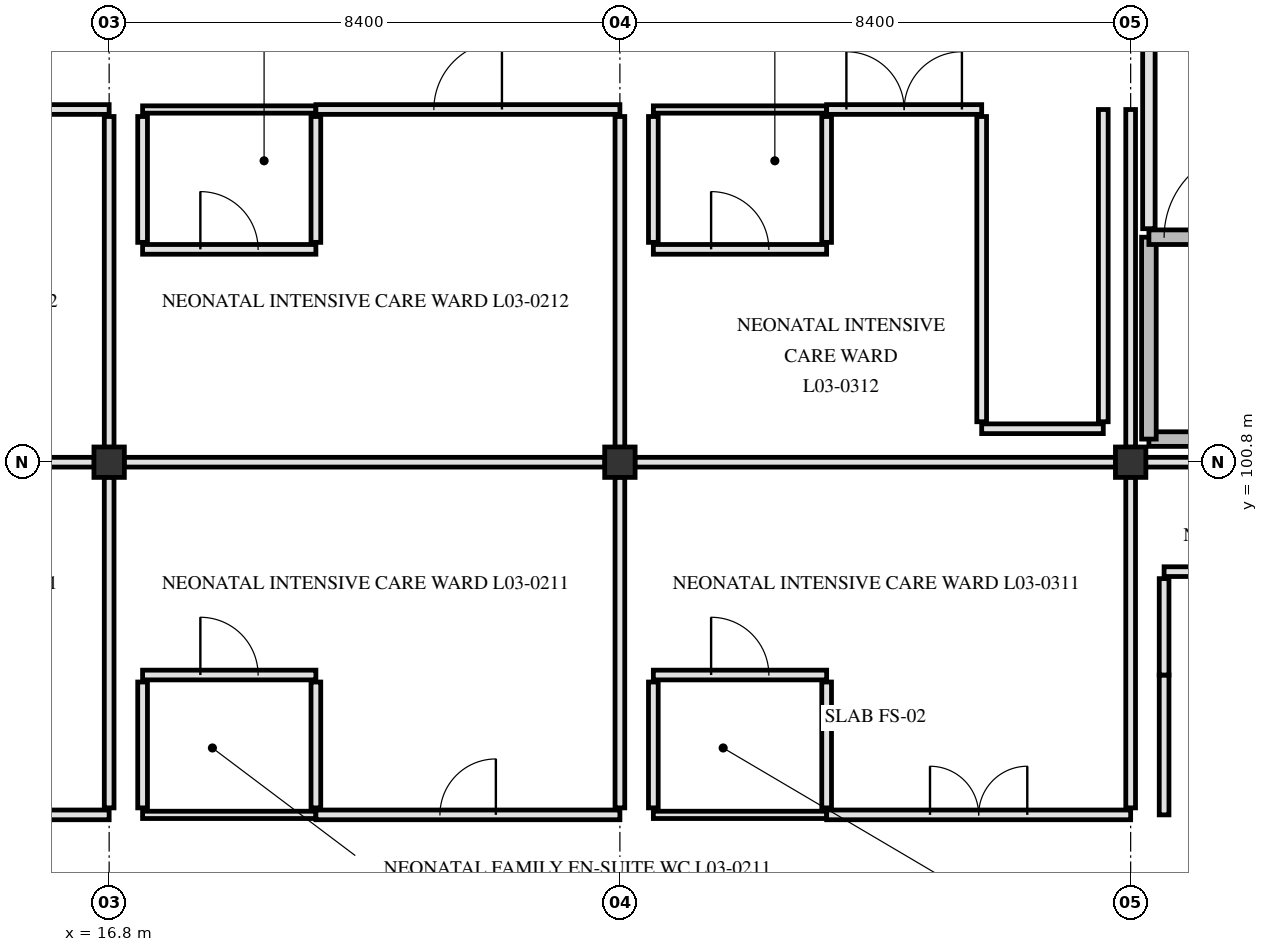
"""IFC4 building model, lengths in metres.
Left out: names, types, materials, properties, quantities, classifications, styles, units other than length and angle.
Written with IfcOpenShell. Run it as: python <this file> out.ifc"""

import sys

from ifc_helpers import new_model, si_unit, direction, frame, frame_2d, origin, origin_2d, place, context, subcontext, project, spatial, rectangle, extrude, element, fill, save


model = new_model("IFC4")
c1 = context("Model", 3, precision=1e-05, world=origin(), true_north=direction((0.0, 1.0)))
c2 = subcontext(c1, "Body", "Model", "MODEL_VIEW")
j1 = project(units=[si_unit("LENGTHUNIT", "METRE"), si_unit("PLANEANGLEUNIT", "RADIAN")], contexts=[c1])
p1 = place(None, origin())
s1 = spatial("IfcSite", under=j1, at=p1, CompositionType="ELEMENT")
p2 = place(p1, origin())
s2 = spatial("IfcBuilding", under=s1, at=p2, CompositionType="ELEMENT")
p3 = place(p2, frame((0.0, 0.0, 14.4)))
s3 = spatial("IfcBuildingStorey", under=s2, at=p3, CompositionType="ELEMENT", Elevation=14.4)
for number, where, z_axis, x_axis in (
    (1, (16.8, 100.8, 0.0), (0.0, 0.0, 1.0), (1.0, 0.0, 0.0)),
    (2, (25.2, 100.8, 0.0), (0.0, 0.0, 1.0), (1.0, 0.0, 0.0)),
    (3, (33.6, 100.8, 0.0), (0.0, 0.0, 1.0), (1.0, 0.0, 0.0)),
):
    element("IfcColumn", number, at=place(p3, frame(where, z_axis=z_axis, x_axis=x_axis)), inside=s3, PredefinedType="COLUMN", context=c2, shape_type="SweptSolid", body=[
        extrude(rectangle(XDim=0.5, YDim=0.5, at=origin_2d()), origin(), (0.0, 0.0, 1.0), 4.2),
    ])
p4 = place(p3, frame((33.9, 101.18, 0.0), z_axis=(0.0, 0.0, 1.0), x_axis=(1.0, 0.0, 0.0)))
e4 = element("IfcWall", 4, at=p4, inside=s3, PredefinedType="SHEAR", context=c2, shape_type="SweptSolid", body=[
    extrude(rectangle(XDim=7.82, YDim=0.24, at=frame_2d((3.91, 0.0))), origin(), (0.0, 0.0, 1.0), 3.9),
])
p5 = place(p3, frame((33.9, 101.18, 0.0), z_axis=(0.0, 0.0, 1.0), x_axis=(0.0, 1.0, 0.0)))
e5 = element("IfcWall", 5, at=p5, inside=s3, PredefinedType="SHEAR", context=c2, shape_type="SweptSolid", body=[
    extrude(rectangle(XDim=3.32, YDim=0.24, at=frame_2d((1.66, 0.0))), origin(), (0.0, 0.0, 1.0), 3.9),
])
p6 = place(p3, frame((33.9, 104.5, 0.0), z_axis=(0.0, 0.0, 1.0), x_axis=(1.0, 0.0, 0.0)))
e6 = element("IfcWall", 6, at=p6, inside=s3, PredefinedType="SHEAR", context=c2, shape_type="SweptSolid", body=[
    extrude(rectangle(XDim=7.82, YDim=0.24, at=frame_2d((3.91, 0.0))), origin(), (0.0, 0.0, 1.0), 3.9),
])
p7 = place(p6, frame((0.25, 0.0, 0.0)))
e7 = element("IfcOpeningElement", 7, at=p7, cuts=e6, PredefinedType="OPENING", context=c2, shape_type="SweptSolid", body=[
    extrude(rectangle(XDim=1.45, YDim=2.2, at=frame_2d((0.725, 1.1))), frame((0.0, 0.13, 0.0), z_axis=(0.0, -1.0, 0.0), x_axis=(1.0, 0.0, 0.0)), (0.0, 0.0, 1.0), 0.26),
])
p8 = place(p3, frame((33.9, 104.64, 0.0), z_axis=(0.0, 0.0, 1.0), x_axis=(0.0, 1.0, 0.0)))
e8 = element("IfcWall", 8, at=p8, inside=s3, PredefinedType="PARTITIONING", context=c2, shape_type="SweptSolid", body=[
    extrude(rectangle(XDim=4.12, YDim=0.205, at=frame_2d((2.06, 0.0))), origin(), (0.0, 0.0, 1.0), 3.33),
])
p9 = place(p3, frame((11.8, 95.0, 0.0), z_axis=(0.0, 0.0, 1.0), x_axis=(1.0, 0.0, 0.0)))
e9 = element("IfcWall", 9, at=p9, inside=s3, PredefinedType="PARTITIONING", context=c2, shape_type="SweptSolid", body=[
    extrude(rectangle(XDim=5.0, YDim=0.16, at=frame_2d((2.5, 0.0))), origin(), (0.0, 0.0, 1.0), 3.33),
])
p10 = place(p9, frame((1.85, 0.0, 0.0)))
e10 = element("IfcOpeningElement", 10, at=p10, cuts=e9, PredefinedType="OPENING", context=c2, shape_type="SweptSolid", body=[
    extrude(rectangle(XDim=1.3, YDim=2.2, at=frame_2d((0.65, 1.1))), frame((0.0, 0.09, 0.0), z_axis=(0.0, -1.0, 0.0), x_axis=(1.0, 0.0, 0.0)), (0.0, 0.0, 1.0), 0.18),
])
p11 = place(p3, frame((17.35, 95.0, 0.0), z_axis=(0.0, 0.0, 1.0), x_axis=(1.0, 0.0, 0.0)))
e11 = element("IfcWall", 11, at=p11, inside=s3, PredefinedType="PARTITIONING", context=c2, shape_type="SweptSolid", body=[
    extrude(rectangle(XDim=2.85, YDim=0.12, at=frame_2d((1.425, 0.0))), origin(), (0.0, 0.0, 1.0), 3.89),
])
p12 = place(p3, frame((20.2, 95.0, 0.0), z_axis=(0.0, 0.0, 1.0), x_axis=(1.0, 0.0, 0.0)))
e12 = element("IfcWall", 12, at=p12, inside=s3, PredefinedType="PARTITIONING", context=c2, shape_type="SweptSolid", body=[
    extrude(rectangle(XDim=5.0, YDim=0.16, at=frame_2d((2.5, 0.0))), origin(), (0.0, 0.0, 1.0), 3.33),
])
p13 = place(p12, frame((2.04, 0.0, 0.0)))
e13 = element("IfcOpeningElement", 13, at=p13, cuts=e12, PredefinedType="OPENING", context=c2, shape_type="SweptSolid", body=[
    extrude(rectangle(XDim=0.92, YDim=2.08, at=frame_2d((0.46, 1.04))), frame((0.0, 0.09, 0.0), z_axis=(0.0, -1.0, 0.0), x_axis=(1.0, 0.0, 0.0)), (0.0, 0.0, 1.0), 0.18),
])
p14 = place(p3, frame((25.75, 95.0, 0.0), z_axis=(0.0, 0.0, 1.0), x_axis=(1.0, 0.0, 0.0)))
e14 = element("IfcWall", 14, at=p14, inside=s3, PredefinedType="PARTITIONING", context=c2, shape_type="SweptSolid", body=[
    extrude(rectangle(XDim=2.85, YDim=0.12, at=frame_2d((1.425, 0.0))), origin(), (0.0, 0.0, 1.0), 3.89),
])
p15 = place(p3, frame((28.6, 95.0, 0.0), z_axis=(0.0, 0.0, 1.0), x_axis=(1.0, 0.0, 0.0)))
e15 = element("IfcWall", 15, at=p15, inside=s3, PredefinedType="PARTITIONING", context=c2, shape_type="SweptSolid", body=[
    extrude(rectangle(XDim=5.0, YDim=0.16, at=frame_2d((2.5, 0.0))), origin(), (0.0, 0.0, 1.0), 3.33),
])
p16 = place(p15, frame((1.7, 0.0, 0.0)))
e16 = element("IfcOpeningElement", 16, at=p16, cuts=e15, PredefinedType="OPENING", context=c2, shape_type="SweptSolid", body=[
    extrude(rectangle(XDim=1.6, YDim=2.25, at=frame_2d((0.8, 1.125))), frame((0.0, 0.09, 0.0), z_axis=(0.0, -1.0, 0.0), x_axis=(1.0, 0.0, 0.0)), (0.0, 0.0, 1.0), 0.18),
])
p17 = place(p3, frame((17.35, 97.3, 0.0), z_axis=(0.0, 0.0, 1.0), x_axis=(1.0, 0.0, 0.0)))
e17 = element("IfcWall", 17, at=p17, inside=s3, PredefinedType="PARTITIONING", context=c2, shape_type="SweptSolid", body=[
    extrude(rectangle(XDim=2.85, YDim=0.16, at=frame_2d((1.425, 0.0))), origin(), (0.0, 0.0, 1.0), 3.89),
])
p18 = place(p17, frame((0.95, 0.0, 0.0)))
e18 = element("IfcOpeningElement", 18, at=p18, cuts=e17, PredefinedType="OPENING", context=c2, shape_type="SweptSolid", body=[
    extrude(rectangle(XDim=0.95, YDim=2.1, at=frame_2d((0.475, 1.05))), frame((0.0, 0.09, 0.0), z_axis=(0.0, -1.0, 0.0), x_axis=(1.0, 0.0, 0.0)), (0.0, 0.0, 1.0), 0.18),
])
p19 = place(p3, frame((25.75, 97.3, 0.0), z_axis=(0.0, 0.0, 1.0), x_axis=(1.0, 0.0, 0.0)))
e19 = element("IfcWall", 19, at=p19, inside=s3, PredefinedType="PARTITIONING", context=c2, shape_type="SweptSolid", body=[
    extrude(rectangle(XDim=2.85, YDim=0.16, at=frame_2d((1.425, 0.0))), origin(), (0.0, 0.0, 1.0), 3.89),
])
p20 = place(p19, frame((0.95, 0.0, 0.0)))
e20 = element("IfcOpeningElement", 20, at=p20, cuts=e19, PredefinedType="OPENING", context=c2, shape_type="SweptSolid", body=[
    extrude(rectangle(XDim=0.95, YDim=2.1, at=frame_2d((0.475, 1.05))), frame((0.0, 0.09, 0.0), z_axis=(0.0, -1.0, 0.0), x_axis=(1.0, 0.0, 0.0)), (0.0, 0.0, 1.0), 0.18),
])
p21 = place(p3, frame((34.15, 99.0, 0.0), z_axis=(0.0, 0.0, 1.0), x_axis=(1.0, 0.0, 0.0)))
e21 = element("IfcWall", 21, at=p21, inside=s3, PredefinedType="PARTITIONING", context=c2, shape_type="SweptSolid", body=[
    extrude(rectangle(XDim=2.1, YDim=0.16, at=frame_2d((1.05, 0.0))), origin(), (0.0, 0.0, 1.0), 3.89),
])
p22 = place(p3, frame((8.645, 100.8, 0.0), z_axis=(0.0, 0.0, 1.0), x_axis=(1.0, 0.0, 0.0)))
e22 = element("IfcWall", 22, at=p22, inside=s3, PredefinedType="PARTITIONING", context=c2, shape_type="SweptSolid", body=[
    extrude(rectangle(XDim=7.91, YDim=0.16, at=frame_2d((3.955, 0.0))), origin(), (0.0, 0.0, 1.0), 3.28),
])
p23 = place(p3, frame((17.045, 100.8, 0.0), z_axis=(0.0, 0.0, 1.0), x_axis=(1.0, 0.0, 0.0)))
e23 = element("IfcWall", 23, at=p23, inside=s3, PredefinedType="PARTITIONING", context=c2, shape_type="SweptSolid", body=[
    extrude(rectangle(XDim=7.91, YDim=0.16, at=frame_2d((3.955, 0.0))), origin(), (0.0, 0.0, 1.0), 3.28),
])
for number, where, z_axis, x_axis in (
    (24, (25.445, 100.8, 0.0), (0.0, 0.0, 1.0), (1.0, 0.0, 0.0)),
    (25, (33.845, 100.8, 0.0), (0.0, 0.0, 1.0), (1.0, 0.0, 0.0)),
):
    element("IfcWall", number, at=place(p3, frame(where, z_axis=z_axis, x_axis=x_axis)), inside=s3, PredefinedType="PARTITIONING", context=c2, shape_type="SweptSolid", body=[
        extrude(rectangle(XDim=7.91, YDim=0.16, at=frame_2d((3.955, 0.0))), origin(), (0.0, 0.0, 1.0), 3.28),
    ])
p24 = place(p3, frame((31.15, 101.35, 0.0), z_axis=(0.0, 0.0, 1.0), x_axis=(1.0, 0.0, 0.0)))
e26 = element("IfcWall", 26, at=p24, inside=s3, PredefinedType="PARTITIONING", context=c2, shape_type="SweptSolid", body=[
    extrude(rectangle(XDim=2.0, YDim=0.16, at=frame_2d((1.0, 0.0))), origin(), (0.0, 0.0, 1.0), 3.89),
])
p25 = place(p3, frame((17.35, 104.3, 0.0), z_axis=(0.0, 0.0, 1.0), x_axis=(1.0, 0.0, 0.0)))
e27 = element("IfcWall", 27, at=p25, inside=s3, PredefinedType="PARTITIONING", context=c2, shape_type="SweptSolid", body=[
    extrude(rectangle(XDim=2.85, YDim=0.16, at=frame_2d((1.425, 0.0))), origin(), (0.0, 0.0, 1.0), 3.89),
])
p26 = place(p25, frame((0.95, 0.0, 0.0)))
e28 = element("IfcOpeningElement", 28, at=p26, cuts=e27, PredefinedType="OPENING", context=c2, shape_type="SweptSolid", body=[
    extrude(rectangle(XDim=0.95, YDim=2.1, at=frame_2d((0.475, 1.05))), frame((0.0, 0.09, 0.0), z_axis=(0.0, -1.0, 0.0), x_axis=(1.0, 0.0, 0.0)), (0.0, 0.0, 1.0), 0.18),
])
p27 = place(p3, frame((25.75, 104.3, 0.0), z_axis=(0.0, 0.0, 1.0), x_axis=(1.0, 0.0, 0.0)))
e29 = element("IfcWall", 29, at=p27, inside=s3, PredefinedType="PARTITIONING", context=c2, shape_type="SweptSolid", body=[
    extrude(rectangle(XDim=2.85, YDim=0.16, at=frame_2d((1.425, 0.0))), origin(), (0.0, 0.0, 1.0), 3.89),
])
p28 = place(p27, frame((0.95, 0.0, 0.0)))
e30 = element("IfcOpeningElement", 30, at=p28, cuts=e29, PredefinedType="OPENING", context=c2, shape_type="SweptSolid", body=[
    extrude(rectangle(XDim=0.95, YDim=2.1, at=frame_2d((0.475, 1.05))), frame((0.0, 0.09, 0.0), z_axis=(0.0, -1.0, 0.0), x_axis=(1.0, 0.0, 0.0)), (0.0, 0.0, 1.0), 0.18),
])
p29 = place(p3, frame((11.8, 106.6, 0.0), z_axis=(0.0, 0.0, 1.0), x_axis=(1.0, 0.0, 0.0)))
e31 = element("IfcWall", 31, at=p29, inside=s3, PredefinedType="PARTITIONING", context=c2, shape_type="SweptSolid", body=[
    extrude(rectangle(XDim=5.0, YDim=0.16, at=frame_2d((2.5, 0.0))), origin(), (0.0, 0.0, 1.0), 3.33),
])
p30 = place(p29, frame((1.73, 0.0, 0.0)))
e32 = element("IfcOpeningElement", 32, at=p30, cuts=e31, PredefinedType="OPENING", context=c2, shape_type="SweptSolid", body=[
    extrude(rectangle(XDim=1.54, YDim=2.24, at=frame_2d((0.77, 1.12))), frame((0.0, 0.09, 0.0), z_axis=(0.0, -1.0, 0.0), x_axis=(1.0, 0.0, 0.0)), (0.0, 0.0, 1.0), 0.18),
])
p31 = place(p3, frame((17.35, 106.6, 0.0), z_axis=(0.0, 0.0, 1.0), x_axis=(1.0, 0.0, 0.0)))
e33 = element("IfcWall", 33, at=p31, inside=s3, PredefinedType="PARTITIONING", context=c2, shape_type="SweptSolid", body=[
    extrude(rectangle(XDim=2.85, YDim=0.12, at=frame_2d((1.425, 0.0))), origin(), (0.0, 0.0, 1.0), 3.89),
])
p32 = place(p3, frame((20.2, 106.6, 0.0), z_axis=(0.0, 0.0, 1.0), x_axis=(1.0, 0.0, 0.0)))
e34 = element("IfcWall", 34, at=p32, inside=s3, PredefinedType="PARTITIONING", context=c2, shape_type="SweptSolid", body=[
    extrude(rectangle(XDim=5.0, YDim=0.16, at=frame_2d((2.5, 0.0))), origin(), (0.0, 0.0, 1.0), 3.33),
])
p33 = place(p32, frame((1.94, 0.0, 0.0)))
e35 = element("IfcOpeningElement", 35, at=p33, cuts=e34, PredefinedType="OPENING", context=c2, shape_type="SweptSolid", body=[
    extrude(rectangle(XDim=1.12, YDim=2.18, at=frame_2d((0.56, 1.09))), frame((0.0, 0.09, 0.0), z_axis=(0.0, -1.0, 0.0), x_axis=(1.0, 0.0, 0.0)), (0.0, 0.0, 1.0), 0.18),
])
p34 = place(p3, frame((25.75, 106.6, 0.0), z_axis=(0.0, 0.0, 1.0), x_axis=(1.0, 0.0, 0.0)))
e36 = element("IfcWall", 36, at=p34, inside=s3, PredefinedType="PARTITIONING", context=c2, shape_type="SweptSolid", body=[
    extrude(rectangle(XDim=2.85, YDim=0.12, at=frame_2d((1.425, 0.0))), origin(), (0.0, 0.0, 1.0), 3.89),
])
p35 = place(p3, frame((28.6, 106.6, 0.0), z_axis=(0.0, 0.0, 1.0), x_axis=(1.0, 0.0, 0.0)))
e37 = element("IfcWall", 37, at=p35, inside=s3, PredefinedType="PARTITIONING", context=c2, shape_type="SweptSolid", body=[
    extrude(rectangle(XDim=2.55, YDim=0.16, at=frame_2d((1.275, 0.0))), origin(), (0.0, 0.0, 1.0), 3.89),
])
p36 = place(p35, frame((0.325, 0.0, 0.0)))
e38 = element("IfcOpeningElement", 38, at=p36, cuts=e37, PredefinedType="OPENING", context=c2, shape_type="SweptSolid", body=[
    extrude(rectangle(XDim=1.9, YDim=2.3, at=frame_2d((0.95, 1.15))), frame((0.0, 0.09, 0.0), z_axis=(0.0, -1.0, 0.0), x_axis=(1.0, 0.0, 0.0)), (0.0, 0.0, 1.0), 0.18),
])
p37 = place(p3, frame((16.8, 95.115, 0.0), z_axis=(0.0, 0.0, 1.0), x_axis=(0.0, 1.0, 0.0)))
e39 = element("IfcWall", 39, at=p37, inside=s3, PredefinedType="PARTITIONING", context=c2, shape_type="SweptSolid", body=[
    extrude(rectangle(XDim=5.44, YDim=0.16, at=frame_2d((2.72, 0.0))), origin(), (0.0, 0.0, 1.0), 3.33),
])
p38 = place(p3, frame((16.8, 101.045, 0.0), z_axis=(0.0, 0.0, 1.0), x_axis=(0.0, 1.0, 0.0)))
e40 = element("IfcWall", 40, at=p38, inside=s3, PredefinedType="PARTITIONING", context=c2, shape_type="SweptSolid", body=[
    extrude(rectangle(XDim=5.44, YDim=0.16, at=frame_2d((2.72, 0.0))), origin(), (0.0, 0.0, 1.0), 3.33),
])
for number, where, z_axis, x_axis in (
    (41, (17.35, 95.115, 0.0), (0.0, 0.0, 1.0), (0.0, 1.0, 0.0)),
    (42, (17.35, 104.415, 0.0), (0.0, 0.0, 1.0), (0.0, 1.0, 0.0)),
    (43, (20.2, 95.115, 0.0), (0.0, 0.0, 1.0), (0.0, 1.0, 0.0)),
    (44, (20.2, 104.415, 0.0), (0.0, 0.0, 1.0), (0.0, 1.0, 0.0)),
):
    element("IfcWall", number, at=place(p3, frame(where, z_axis=z_axis, x_axis=x_axis)), inside=s3, PredefinedType="PARTITIONING", context=c2, shape_type="SweptSolid", body=[
        extrude(rectangle(XDim=2.07, YDim=0.16, at=frame_2d((1.035, 0.0))), origin(), (0.0, 0.0, 1.0), 3.89),
    ])
p39 = place(p3, frame((25.2, 95.115, 0.0), z_axis=(0.0, 0.0, 1.0), x_axis=(0.0, 1.0, 0.0)))
e45 = element("IfcWall", 45, at=p39, inside=s3, PredefinedType="PARTITIONING", context=c2, shape_type="SweptSolid", body=[
    extrude(rectangle(XDim=5.44, YDim=0.16, at=frame_2d((2.72, 0.0))), origin(), (0.0, 0.0, 1.0), 3.33),
])
p40 = place(p3, frame((25.2, 101.045, 0.0), z_axis=(0.0, 0.0, 1.0), x_axis=(0.0, 1.0, 0.0)))
e46 = element("IfcWall", 46, at=p40, inside=s3, PredefinedType="PARTITIONING", context=c2, shape_type="SweptSolid", body=[
    extrude(rectangle(XDim=5.44, YDim=0.16, at=frame_2d((2.72, 0.0))), origin(), (0.0, 0.0, 1.0), 3.33),
])
for number, where, z_axis, x_axis in (
    (47, (25.75, 95.115, 0.0), (0.0, 0.0, 1.0), (0.0, 1.0, 0.0)),
    (48, (25.75, 104.415, 0.0), (0.0, 0.0, 1.0), (0.0, 1.0, 0.0)),
    (49, (28.6, 95.115, 0.0), (0.0, 0.0, 1.0), (0.0, 1.0, 0.0)),
    (50, (28.6, 104.415, 0.0), (0.0, 0.0, 1.0), (0.0, 1.0, 0.0)),
):
    element("IfcWall", number, at=place(p3, frame(where, z_axis=z_axis, x_axis=x_axis)), inside=s3, PredefinedType="PARTITIONING", context=c2, shape_type="SweptSolid", body=[
        extrude(rectangle(XDim=2.07, YDim=0.16, at=frame_2d((1.035, 0.0))), origin(), (0.0, 0.0, 1.0), 3.89),
    ])
p41 = place(p3, frame((31.15, 101.465, 0.0), z_axis=(0.0, 0.0, 1.0), x_axis=(0.0, 1.0, 0.0)))
e51 = element("IfcWall", 51, at=p41, inside=s3, PredefinedType="PARTITIONING", context=c2, shape_type="SweptSolid", body=[
    extrude(rectangle(XDim=5.02, YDim=0.16, at=frame_2d((2.51, 0.0))), origin(), (0.0, 0.0, 1.0), 3.89),
])
p42 = place(p3, frame((33.15, 101.465, 0.0), z_axis=(0.0, 0.0, 1.0), x_axis=(0.0, 1.0, 0.0)))
e52 = element("IfcWall", 52, at=p42, inside=s3, PredefinedType="PARTITIONING", context=c2, shape_type="SweptSolid", body=[
    extrude(rectangle(XDim=5.135, YDim=0.16, at=frame_2d((2.567, 0.0))), origin(), (0.0, 0.0, 1.0), 3.89),
])
p43 = place(p3, frame((33.6, 95.115, 0.0), z_axis=(0.0, 0.0, 1.0), x_axis=(0.0, 1.0, 0.0)))
e53 = element("IfcWall", 53, at=p43, inside=s3, PredefinedType="PARTITIONING", context=c2, shape_type="SweptSolid", body=[
    extrude(rectangle(XDim=5.44, YDim=0.16, at=frame_2d((2.72, 0.0))), origin(), (0.0, 0.0, 1.0), 3.33),
])
p44 = place(p3, frame((33.6, 101.045, 0.0), z_axis=(0.0, 0.0, 1.0), x_axis=(0.0, 1.0, 0.0)))
e54 = element("IfcWall", 54, at=p44, inside=s3, PredefinedType="PARTITIONING", context=c2, shape_type="SweptSolid", body=[
    extrude(rectangle(XDim=5.555, YDim=0.16, at=frame_2d((2.778, 0.0))), origin(), (0.0, 0.0, 1.0), 3.33),
])
p45 = place(p3, frame((34.15, 95.0, 0.0), z_axis=(0.0, 0.0, 1.0), x_axis=(0.0, 1.0, 0.0)))
e55 = element("IfcWall", 55, at=p45, inside=s3, PredefinedType="PARTITIONING", context=c2, shape_type="SweptSolid", body=[
    extrude(rectangle(XDim=2.3, YDim=0.16, at=frame_2d((1.15, 0.0))), origin(), (0.0, 0.0, 1.0), 3.89),
])
p46 = place(p3, frame((34.15, 97.3, 0.0), z_axis=(0.0, 0.0, 1.0), x_axis=(0.0, 1.0, 0.0)))
e56 = element("IfcWall", 56, at=p46, inside=s3, PredefinedType="PARTITIONING", context=c2, shape_type="SweptSolid", body=[
    extrude(rectangle(XDim=1.585, YDim=0.16, at=frame_2d((0.792, 0.0))), origin(), (0.0, 0.0, 1.0), 3.89),
])
p47 = place(p7, origin())
e57 = element("IfcDoor", 57, at=p47, inside=s3, OperationType="SINGLE_SWING_RIGHT", PredefinedType="DOOR", context=c2, shape_type="SweptSolid", body=[
    extrude(rectangle(XDim=1.45, YDim=2.2, at=frame_2d((0.725, 1.1))), frame((0.0, 0.025, 0.0), z_axis=(0.0, -1.0, 0.0), x_axis=(1.0, 0.0, 0.0)), (0.0, 0.0, 1.0), 0.05),
])
fill(e7, e57)
p48 = place(p13, origin())
e58 = element("IfcDoor", 58, at=p48, inside=s3, OperationType="SINGLE_SWING_RIGHT", PredefinedType="DOOR", context=c2, shape_type="SweptSolid", body=[
    extrude(rectangle(XDim=0.92, YDim=2.08, at=frame_2d((0.46, 1.04))), frame((0.0, 0.025, 0.0), z_axis=(0.0, -1.0, 0.0), x_axis=(1.0, 0.0, 0.0)), (0.0, 0.0, 1.0), 0.05),
])
fill(e13, e58)
p49 = place(p18, origin())
e59 = element("IfcDoor", 59, at=p49, inside=s3, OperationType="SINGLE_SWING_LEFT", PredefinedType="DOOR", context=c2, shape_type="SweptSolid", body=[
    extrude(rectangle(XDim=0.95, YDim=2.1, at=frame_2d((0.475, 1.05))), frame((0.0, 0.025, 0.0), z_axis=(0.0, -1.0, 0.0), x_axis=(1.0, 0.0, 0.0)), (0.0, 0.0, 1.0), 0.05),
])
fill(e18, e59)
p50 = place(p33, origin())
e60 = element("IfcDoor", 60, at=p50, inside=s3, OperationType="SINGLE_SWING_RIGHT", PredefinedType="DOOR", context=c2, shape_type="SweptSolid", body=[
    extrude(rectangle(XDim=1.12, YDim=2.18, at=frame_2d((0.56, 1.09))), frame((0.0, 0.025, 0.0), z_axis=(0.0, -1.0, 0.0), x_axis=(1.0, 0.0, 0.0)), (0.0, 0.0, 1.0), 0.05),
])
fill(e35, e60)
p51 = place(p26, origin())
e61 = element("IfcDoor", 61, at=p51, inside=s3, OperationType="SINGLE_SWING_LEFT", PredefinedType="DOOR", context=c2, shape_type="SweptSolid", body=[
    extrude(rectangle(XDim=0.95, YDim=2.1, at=frame_2d((0.475, 1.05))), frame((0.0, 0.025, 0.0), z_axis=(0.0, -1.0, 0.0), x_axis=(1.0, 0.0, 0.0)), (0.0, 0.0, 1.0), 0.05),
])
fill(e28, e61)
p52 = place(p16, origin())
e62 = element("IfcDoor", 62, at=p52, inside=s3, OperationType="DOUBLE_SWING_LEFT", PredefinedType="DOOR", context=c2, shape_type="SweptSolid", body=[
    extrude(rectangle(XDim=1.6, YDim=2.25, at=frame_2d((0.8, 1.125))), frame((0.0, 0.025, 0.0), z_axis=(0.0, -1.0, 0.0), x_axis=(1.0, 0.0, 0.0)), (0.0, 0.0, 1.0), 0.05),
])
fill(e16, e62)
p53 = place(p20, origin())
e63 = element("IfcDoor", 63, at=p53, inside=s3, OperationType="SINGLE_SWING_LEFT", PredefinedType="DOOR", context=c2, shape_type="SweptSolid", body=[
    extrude(rectangle(XDim=0.95, YDim=2.1, at=frame_2d((0.475, 1.05))), frame((0.0, 0.025, 0.0), z_axis=(0.0, -1.0, 0.0), x_axis=(1.0, 0.0, 0.0)), (0.0, 0.0, 1.0), 0.05),
])
fill(e20, e63)
p54 = place(p36, origin())
e64 = element("IfcDoor", 64, at=p54, inside=s3, OperationType="DOUBLE_SWING_LEFT", PredefinedType="DOOR", context=c2, shape_type="SweptSolid", body=[
    extrude(rectangle(XDim=1.9, YDim=2.3, at=frame_2d((0.95, 1.15))), frame((0.0, 0.025, 0.0), z_axis=(0.0, -1.0, 0.0), x_axis=(1.0, 0.0, 0.0)), (0.0, 0.0, 1.0), 0.05),
])
fill(e38, e64)
p55 = place(p28, origin())
e65 = element("IfcDoor", 65, at=p55, inside=s3, OperationType="SINGLE_SWING_LEFT", PredefinedType="DOOR", context=c2, shape_type="SweptSolid", body=[
    extrude(rectangle(XDim=0.95, YDim=2.1, at=frame_2d((0.475, 1.05))), frame((0.0, 0.025, 0.0), z_axis=(0.0, -1.0, 0.0), x_axis=(1.0, 0.0, 0.0)), (0.0, 0.0, 1.0), 0.05),
])
fill(e30, e65)
save(model, sys.argv[1])
